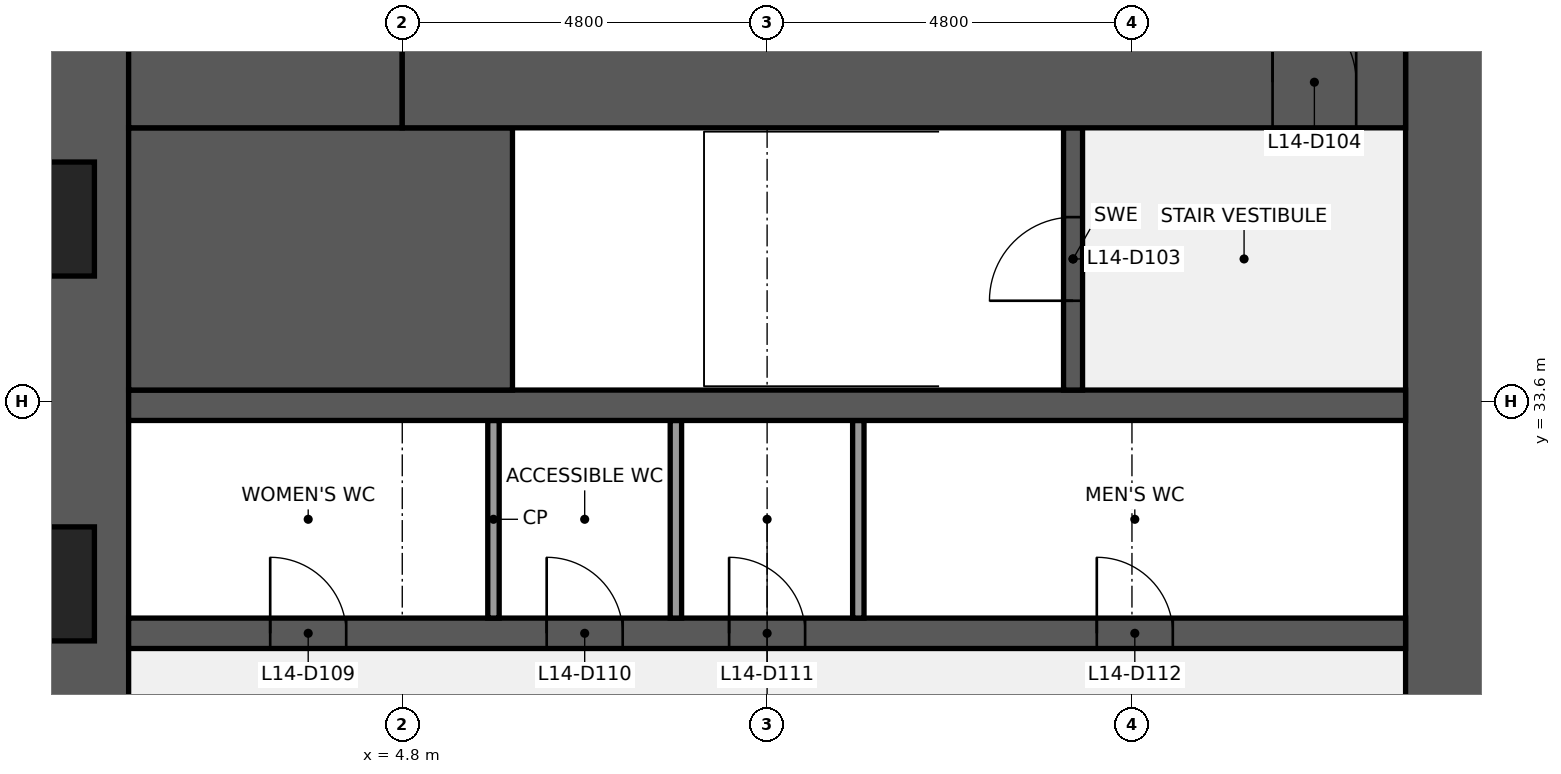
"""IFC4 building model, lengths in metres.
Left out: names, types, materials, properties, quantities, classifications, styles, units other than length and angle.
Written with IfcOpenShell. Run it as: python <this file> out.ifc"""

import sys

from ifc_helpers import new_model, si_unit, direction, frame, frame_2d, origin, place, context, subcontext, project, spatial, rectangle, extrude, element, fill, save


model = new_model("IFC4")
c1 = context("Model", 3, precision=1e-05, world=origin(), true_north=direction((0.0, 1.0)))
c2 = subcontext(c1, "Body", "Model", "MODEL_VIEW")
j1 = project(units=[si_unit("LENGTHUNIT", "METRE"), si_unit("PLANEANGLEUNIT", "RADIAN")], contexts=[c1])
p1 = place(None, origin())
s1 = spatial("IfcSite", under=j1, at=p1, CompositionType="ELEMENT")
p2 = place(p1, origin())
s2 = spatial("IfcBuilding", under=s1, at=p2, CompositionType="ELEMENT")
p3 = place(p2, frame((0.0, 0.0, 67.0)))
s3 = spatial("IfcBuildingStorey", under=s2, at=p3, CompositionType="ELEMENT", Elevation=67.0)
p4 = place(p3, frame((0.6, 9.6, 0.0), z_axis=(0.0, 0.0, 1.0), x_axis=(0.0, 1.0, 0.0)))
e1 = element("IfcWall", 1, at=p4, inside=s3, PredefinedType="SHEAR", context=c2, shape_type="SweptSolid", body=[
    extrude(rectangle(XDim=28.8, YDim=1.2, at=frame_2d((14.4, 0.0))), origin(), (0.0, 0.0, 1.0), 3.84),
])
p5 = place(p4, frame((8.85, 0.0, 0.9)))
e2 = element("IfcOpeningElement", 2, at=p5, cuts=e1, PredefinedType="OPENING", context=c2, shape_type="SweptSolid", body=[
    extrude(rectangle(XDim=1.5, YDim=1.5, at=frame_2d((0.75, 0.75))), frame((0.0, 0.61, 0.0), z_axis=(0.0, -1.0, 0.0), x_axis=(1.0, 0.0, 0.0)), (0.0, 0.0, 1.0), 1.22),
])
p6 = place(p4, frame((18.45, 0.0, 0.9)))
e3 = element("IfcOpeningElement", 3, at=p6, cuts=e1, PredefinedType="OPENING", context=c2, shape_type="SweptSolid", body=[
    extrude(rectangle(XDim=1.5, YDim=1.5, at=frame_2d((0.75, 0.75))), frame((0.0, 0.61, 0.0), z_axis=(0.0, -1.0, 0.0), x_axis=(1.0, 0.0, 0.0)), (0.0, 0.0, 1.0), 1.22),
])
p7 = place(p3, frame((18.6, 38.4, 0.0), z_axis=(0.0, 0.0, 1.0), x_axis=(0.0, -1.0, 0.0)))
e4 = element("IfcWall", 4, at=p7, inside=s3, PredefinedType="SHEAR", context=c2, shape_type="SweptSolid", body=[
    extrude(rectangle(XDim=28.8, YDim=1.2, at=frame_2d((14.4, 0.0))), origin(), (0.0, 0.0, 1.0), 3.84),
])
p8 = place(p7, frame((18.3, 0.0, 0.0)))
e5 = element("IfcOpeningElement", 5, at=p8, cuts=e4, PredefinedType="OPENING", context=c2, shape_type="SweptSolid", body=[
    extrude(rectangle(XDim=1.8, YDim=2.1, at=frame_2d((0.9, 1.05))), frame((0.0, 0.61, 0.0), z_axis=(0.0, -1.0, 0.0), x_axis=(1.0, 0.0, 0.0)), (0.0, 0.0, 1.0), 1.22),
])
p9 = place(p7, frame((8.7, 0.0, 0.0)))
e6 = element("IfcOpeningElement", 6, at=p9, cuts=e4, PredefinedType="OPENING", context=c2, shape_type="SweptSolid", body=[
    extrude(rectangle(XDim=1.8, YDim=2.1, at=frame_2d((0.9, 1.05))), frame((0.0, 0.61, 0.0), z_axis=(0.0, -1.0, 0.0), x_axis=(1.0, 0.0, 0.0)), (0.0, 0.0, 1.0), 1.22),
])
p10 = place(p3, frame((1.2, 30.55, 0.0), z_axis=(0.0, 0.0, 1.0), x_axis=(1.0, 0.0, 0.0)))
e7 = element("IfcWall", 7, at=p10, inside=s3, PredefinedType="SHEAR", context=c2, shape_type="SweptSolid", body=[
    extrude(rectangle(XDim=16.8, YDim=0.4, at=frame_2d((8.4, 0.0))), origin(), (0.0, 0.0, 1.0), 3.84),
])
p11 = place(p10, frame((1.863, 0.0, 0.0)))
e8 = element("IfcOpeningElement", 8, at=p11, cuts=e7, PredefinedType="OPENING", context=c2, shape_type="SweptSolid", body=[
    extrude(rectangle(XDim=1.0, YDim=2.1, at=frame_2d((0.5, 1.05))), frame((0.0, 0.21, 0.0), z_axis=(0.0, -1.0, 0.0), x_axis=(1.0, 0.0, 0.0)), (0.0, 0.0, 1.0), 0.42),
])
p12 = place(p10, frame((5.5, 0.0, 0.0)))
e9 = element("IfcOpeningElement", 9, at=p12, cuts=e7, PredefinedType="OPENING", context=c2, shape_type="SweptSolid", body=[
    extrude(rectangle(XDim=1.0, YDim=2.1, at=frame_2d((0.5, 1.05))), frame((0.0, 0.21, 0.0), z_axis=(0.0, -1.0, 0.0), x_axis=(1.0, 0.0, 0.0)), (0.0, 0.0, 1.0), 0.42),
])
p13 = place(p10, frame((7.9, 0.0, 0.0)))
e10 = element("IfcOpeningElement", 10, at=p13, cuts=e7, PredefinedType="OPENING", context=c2, shape_type="SweptSolid", body=[
    extrude(rectangle(XDim=1.0, YDim=2.1, at=frame_2d((0.5, 1.05))), frame((0.0, 0.21, 0.0), z_axis=(0.0, -1.0, 0.0), x_axis=(1.0, 0.0, 0.0)), (0.0, 0.0, 1.0), 0.42),
])
p14 = place(p10, frame((12.738, 0.0, 0.0)))
e11 = element("IfcOpeningElement", 11, at=p14, cuts=e7, PredefinedType="OPENING", context=c2, shape_type="SweptSolid", body=[
    extrude(rectangle(XDim=1.0, YDim=2.1, at=frame_2d((0.5, 1.05))), frame((0.0, 0.21, 0.0), z_axis=(0.0, -1.0, 0.0), x_axis=(1.0, 0.0, 0.0)), (0.0, 0.0, 1.0), 0.42),
])
for number, where, z_axis, x_axis in (
    (12, (6.0, 30.75, 0.0), (0.0, 0.0, 1.0), (0.0, 1.0, 0.0)),
    (13, (8.4, 30.75, 0.0), (0.0, 0.0, 1.0), (0.0, 1.0, 0.0)),
    (14, (10.8, 30.75, 0.0), (0.0, 0.0, 1.0), (0.0, 1.0, 0.0)),
):
    element("IfcWall", number, at=place(p3, frame(where, z_axis=z_axis, x_axis=x_axis)), inside=s3, PredefinedType="PARTITIONING", context=c2, shape_type="SweptSolid", body=[
        extrude(rectangle(XDim=2.6, YDim=0.15, at=frame_2d((1.3, 0.0))), origin(), (0.0, 0.0, 1.0), 3.84),
    ])
p15 = place(p3, frame((1.2, 33.55, 0.0), z_axis=(0.0, 0.0, 1.0), x_axis=(1.0, 0.0, 0.0)))
e15 = element("IfcWall", 15, at=p15, inside=s3, PredefinedType="SHEAR", context=c2, shape_type="SweptSolid", body=[
    extrude(rectangle(XDim=16.8, YDim=0.4, at=frame_2d((8.4, 0.0))), origin(), (0.0, 0.0, 1.0), 3.84),
])
p16 = place(p3, frame((1.2, 35.475, 0.0), z_axis=(0.0, 0.0, 1.0), x_axis=(1.0, 0.0, 0.0)))
e16 = element("IfcWall", 16, at=p16, inside=s3, PredefinedType="SHEAR", context=c2, shape_type="SweptSolid", body=[
    extrude(rectangle(XDim=5.05, YDim=3.45, at=frame_2d((2.525, 0.0))), origin(), (0.0, 0.0, 1.0), 3.84),
])
p17 = place(p3, frame((13.625, 33.75, 0.0), z_axis=(0.0, 0.0, 1.0), x_axis=(0.0, 1.0, 0.0)))
e17 = element("IfcWall", 17, at=p17, inside=s3, PredefinedType="SHEAR", context=c2, shape_type="SweptSolid", body=[
    extrude(rectangle(XDim=3.45, YDim=0.25, at=frame_2d((1.725, 0.0))), origin(), (0.0, 0.0, 1.0), 3.84),
])
p18 = place(p17, frame((1.175, 0.0, 0.0)))
e18 = element("IfcOpeningElement", 18, at=p18, cuts=e17, PredefinedType="OPENING", context=c2, shape_type="SweptSolid", body=[
    extrude(rectangle(XDim=1.1, YDim=2.1, at=frame_2d((0.55, 1.05))), frame((0.0, 0.135, 0.0), z_axis=(0.0, -1.0, 0.0), x_axis=(1.0, 0.0, 0.0)), (0.0, 0.0, 1.0), 0.27),
])
p19 = place(p3, frame((1.2, 37.8, 0.0), z_axis=(0.0, 0.0, 1.0), x_axis=(1.0, 0.0, 0.0)))
e19 = element("IfcWall", 19, at=p19, inside=s3, PredefinedType="SHEAR", context=c2, shape_type="SweptSolid", body=[
    extrude(rectangle(XDim=3.6, YDim=1.2, at=frame_2d((1.8, 0.0))), origin(), (0.0, 0.0, 1.0), 3.84),
])
p20 = place(p3, frame((4.8, 37.8, 0.0), z_axis=(0.0, 0.0, 1.0), x_axis=(1.0, 0.0, 0.0)))
e20 = element("IfcWall", 20, at=p20, inside=s3, PredefinedType="SHEAR", context=c2, shape_type="SweptSolid", body=[
    extrude(rectangle(XDim=13.2, YDim=1.2, at=frame_2d((6.6, 0.0))), origin(), (0.0, 0.0, 1.0), 3.84),
])
p21 = place(p20, frame((11.45, 0.0, 0.0)))
e21 = element("IfcOpeningElement", 21, at=p21, cuts=e20, PredefinedType="OPENING", context=c2, shape_type="SweptSolid", body=[
    extrude(rectangle(XDim=1.1, YDim=2.1, at=frame_2d((0.55, 1.05))), frame((0.0, 0.61, 0.0), z_axis=(0.0, -1.0, 0.0), x_axis=(1.0, 0.0, 0.0)), (0.0, 0.0, 1.0), 1.22),
])
p22 = place(p18, origin())
e22 = element("IfcDoor", 22, at=p22, inside=s3, OperationType="SINGLE_SWING_LEFT", PredefinedType="DOOR", context=c2, shape_type="SweptSolid", body=[
    extrude(rectangle(XDim=1.1, YDim=2.1, at=frame_2d((0.55, 1.05))), frame((0.0, 0.025, 0.0), z_axis=(0.0, -1.0, 0.0), x_axis=(1.0, 0.0, 0.0)), (0.0, 0.0, 1.0), 0.05),
])
fill(e18, e22)
p23 = place(p21, origin())
e23 = element("IfcDoor", 23, at=p23, inside=s3, OperationType="SINGLE_SWING_LEFT", PredefinedType="DOOR", context=c2, shape_type="SweptSolid", body=[
    extrude(rectangle(XDim=1.1, YDim=2.1, at=frame_2d((0.55, 1.05))), frame((0.0, 0.025, 0.0), z_axis=(0.0, -1.0, 0.0), x_axis=(1.0, 0.0, 0.0)), (0.0, 0.0, 1.0), 0.05),
])
fill(e21, e23)
p24 = place(p11, origin())
e24 = element("IfcDoor", 24, at=p24, inside=s3, OperationType="SINGLE_SWING_LEFT", PredefinedType="DOOR", context=c2, shape_type="SweptSolid", body=[
    extrude(rectangle(XDim=1.0, YDim=2.1, at=frame_2d((0.5, 1.05))), frame((0.0, 0.025, 0.0), z_axis=(0.0, -1.0, 0.0), x_axis=(1.0, 0.0, 0.0)), (0.0, 0.0, 1.0), 0.05),
])
fill(e8, e24)
p25 = place(p12, origin())
e25 = element("IfcDoor", 25, at=p25, inside=s3, OperationType="SINGLE_SWING_LEFT", PredefinedType="DOOR", context=c2, shape_type="SweptSolid", body=[
    extrude(rectangle(XDim=1.0, YDim=2.1, at=frame_2d((0.5, 1.05))), frame((0.0, 0.025, 0.0), z_axis=(0.0, -1.0, 0.0), x_axis=(1.0, 0.0, 0.0)), (0.0, 0.0, 1.0), 0.05),
])
fill(e9, e25)
p26 = place(p13, origin())
e26 = element("IfcDoor", 26, at=p26, inside=s3, OperationType="SINGLE_SWING_LEFT", PredefinedType="DOOR", context=c2, shape_type="SweptSolid", body=[
    extrude(rectangle(XDim=1.0, YDim=2.1, at=frame_2d((0.5, 1.05))), frame((0.0, 0.025, 0.0), z_axis=(0.0, -1.0, 0.0), x_axis=(1.0, 0.0, 0.0)), (0.0, 0.0, 1.0), 0.05),
])
fill(e10, e26)
p27 = place(p14, origin())
e27 = element("IfcDoor", 27, at=p27, inside=s3, OperationType="SINGLE_SWING_LEFT", PredefinedType="DOOR", context=c2, shape_type="SweptSolid", body=[
    extrude(rectangle(XDim=1.0, YDim=2.1, at=frame_2d((0.5, 1.05))), frame((0.0, 0.025, 0.0), z_axis=(0.0, -1.0, 0.0), x_axis=(1.0, 0.0, 0.0)), (0.0, 0.0, 1.0), 0.05),
])
fill(e11, e27)
save(model, sys.argv[1])
